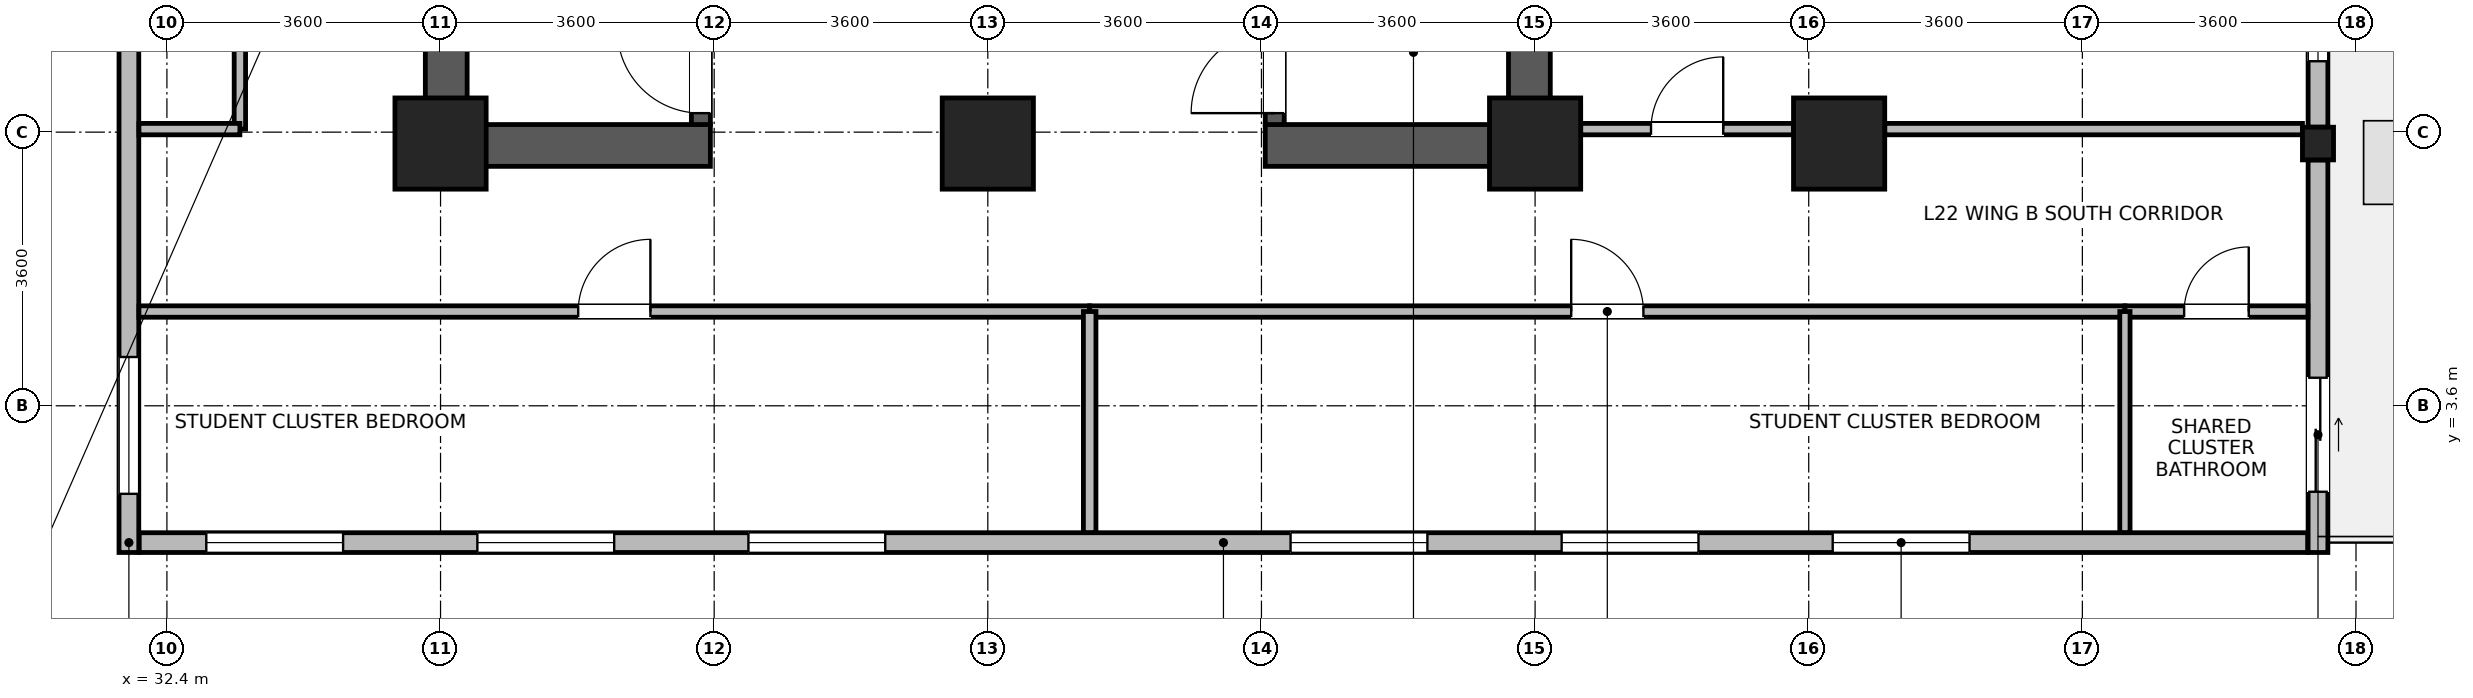
"""IFC4 building model, lengths in metres.
Left out: names, types, materials, properties, quantities, classifications, styles, units other than length and angle.
Written with IfcOpenShell. Run it as: python <this file> out.ifc"""

import sys

from ifc_helpers import new_model, si_unit, direction, frame, frame_2d, origin, origin_2d, place, context, subcontext, project, spatial, rectangle, i_section, extrude, source, transform, mapped, element, fill, save


model = new_model("IFC4")
c1 = context("Model", 3, precision=1e-05, world=origin(), true_north=direction((0.0, 1.0)))
c2 = subcontext(c1, "Body", "Model", "MODEL_VIEW")
j1 = project(units=[si_unit("LENGTHUNIT", "METRE"), si_unit("PLANEANGLEUNIT", "RADIAN")], contexts=[c1])
p1 = place(None, origin())
s1 = spatial("IfcSite", under=j1, at=p1, CompositionType="ELEMENT")
p2 = place(p1, origin())
s2 = spatial("IfcBuilding", under=s1, at=p2, CompositionType="ELEMENT")
p3 = place(p2, frame((0.0, 0.0, 89.7)))
s3 = spatial("IfcBuildingStorey", under=s2, at=p3, CompositionType="ELEMENT", Elevation=89.7)
for number, where, z_axis, x_axis in (
    (1, (36.075, 6.75, 0.0), (0.0, 0.0, 1.0), (0.0, 1.0, 0.0)),
    (2, (50.325, 6.75, 0.0), (0.0, 0.0, 1.0), (0.0, 1.0, 0.0)),
):
    element("IfcWall", number, at=place(p3, frame(where, z_axis=z_axis, x_axis=x_axis)), inside=s3, PredefinedType="SHEAR", context=c2, shape_type="SweptSolid", body=[
        extrude(rectangle(XDim=8.1, YDim=0.55, at=frame_2d((4.05, 0.0))), origin(), (0.0, 0.0, 1.0), 3.45),
    ])
for number, where, z_axis, x_axis in (
    (3, (36.35, 7.025, 0.0), (0.0, 0.0, 1.0), (1.0, 0.0, 0.0)),
    (4, (46.85, 7.025, 0.0), (0.0, 0.0, 1.0), (1.0, 0.0, 0.0)),
):
    element("IfcWall", number, at=place(p3, frame(where, z_axis=z_axis, x_axis=x_axis)), inside=s3, PredefinedType="SHEAR", context=c2, shape_type="SweptSolid", body=[
        extrude(rectangle(XDim=3.2, YDim=0.55, at=frame_2d((1.6, 0.0))), origin(), (0.0, 0.0, 1.0), 3.45),
    ])
p4 = place(p3, frame((39.425, 7.3, 0.0), z_axis=(0.0, 0.0, 1.0), x_axis=(0.0, 1.0, 0.0)))
e5 = element("IfcWall", 5, at=p4, inside=s3, PredefinedType="SHEAR", context=c2, shape_type="SweptSolid", body=[
    extrude(rectangle(XDim=7.0, YDim=0.25, at=frame_2d((3.5, 0.0))), origin(), (0.0, 0.0, 1.0), 3.45),
])
p5 = place(p4, frame((0.15, 0.0, 0.0)))
e6 = element("IfcOpeningElement", 6, at=p5, cuts=e5, PredefinedType="OPENING", context=c2, shape_type="SweptSolid", body=[
    extrude(rectangle(XDim=1.1, YDim=2.08, at=frame_2d((0.55, 1.04))), frame((0.0, 0.135, 0.0), z_axis=(0.0, -1.0, 0.0), x_axis=(1.0, 0.0, 0.0)), (0.0, 0.0, 1.0), 0.27),
])
p6 = place(p3, frame((46.975, 7.3, 0.0), z_axis=(0.0, 0.0, 1.0), x_axis=(0.0, 1.0, 0.0)))
e7 = element("IfcWall", 7, at=p6, inside=s3, PredefinedType="SHEAR", context=c2, shape_type="SweptSolid", body=[
    extrude(rectangle(XDim=7.0, YDim=0.25, at=frame_2d((3.5, 0.0))), origin(), (0.0, 0.0, 1.0), 3.45),
])
p7 = place(p6, frame((0.15, 0.0, 0.0)))
e8 = element("IfcOpeningElement", 8, at=p7, cuts=e7, PredefinedType="OPENING", context=c2, shape_type="SweptSolid", body=[
    extrude(rectangle(XDim=1.1, YDim=2.08, at=frame_2d((0.55, 1.04))), frame((0.0, 0.135, 0.0), z_axis=(0.0, -1.0, 0.0), x_axis=(1.0, 0.0, 0.0)), (0.0, 0.0, 1.0), 0.27),
])
m1 = source(origin(), c2, "Body", "SweptSolid", [
    extrude(rectangle(XDim=1.2, YDim=1.2, at=origin_2d()), origin(), (0.0, 0.0, 1.0), 3.7),
])
for number, where, z_axis, x_axis in (
    (9, (36.0, 7.05, 0.0), (0.0, 0.0, 1.0), (1.0, 0.0, 0.0)),
    (10, (43.2, 7.05, 0.0), (0.0, 0.0, 1.0), (1.0, 0.0, 0.0)),
    (11, (50.4, 7.05, 0.0), (0.0, 0.0, 1.0), (1.0, 0.0, 0.0)),
    (12, (54.4, 7.05, 0.0), (0.0, 0.0, 1.0), (1.0, 0.0, 0.0)),
):
    element("IfcColumn", number, at=place(p3, frame(where, z_axis=z_axis, x_axis=x_axis)), inside=s3, PredefinedType="COLUMN", context=c2, shape_type="MappedRepresentation", body=[
        mapped(m1, transform((0.0, 0.0, 0.0), x_axis=(1.0, 0.0, 0.0), y_axis=(0.0, 1.0, 0.0), z_axis=(0.0, 0.0, 1.0), scale=1.0)),
    ])
m2 = source(origin(), c2, "Body", "SweptSolid", [
    extrude(i_section(OverallWidth=0.409, OverallDepth=0.43, WebThickness=0.024, FlangeThickness=0.033, FilletRadius=0.015, at=origin_2d()), origin(), (0.0, 0.0, 1.0), 3.7),
])
p8 = place(p3, frame((60.7, 7.05, 0.0), z_axis=(0.0, 0.0, 1.0), x_axis=(1.0, 0.0, 0.0)))
e13 = element("IfcColumn", 13, at=p8, inside=s3, PredefinedType="COLUMN", context=c2, shape_type="MappedRepresentation", body=[
    mapped(m2, transform((0.0, 0.0, 0.0), x_axis=(1.0, 0.0, 0.0), y_axis=(0.0, 1.0, 0.0), z_axis=(0.0, 0.0, 1.0), scale=1.0)),
])
p9 = place(p3, frame((60.565, 1.8, 0.0), z_axis=(0.0, 0.0, 1.0), x_axis=(-1.0, 0.0, 0.0)))
e14 = element("IfcWall", 14, at=p9, inside=s3, PredefinedType="STANDARD", context=c2, shape_type="SweptSolid", body=[
    extrude(rectangle(XDim=28.53, YDim=0.26, at=frame_2d((14.265, 0.0))), origin(), (0.0, 0.0, 1.0), 3.43),
])
p10 = place(p9, frame((4.449, 0.0, 0.85)))
e15 = element("IfcOpeningElement", 15, at=p10, cuts=e14, PredefinedType="OPENING", context=c2, shape_type="SweptSolid", body=[
    extrude(rectangle(XDim=1.8, YDim=1.85, at=frame_2d((0.9, 0.925))), frame((0.0, 0.14, 0.0), z_axis=(0.0, -1.0, 0.0), x_axis=(1.0, 0.0, 0.0)), (0.0, 0.0, 1.0), 0.28),
])
p11 = place(p9, frame((8.016, 0.0, 0.85)))
e16 = element("IfcOpeningElement", 16, at=p11, cuts=e14, PredefinedType="OPENING", context=c2, shape_type="SweptSolid", body=[
    extrude(rectangle(XDim=1.8, YDim=1.85, at=frame_2d((0.9, 0.925))), frame((0.0, 0.14, 0.0), z_axis=(0.0, -1.0, 0.0), x_axis=(1.0, 0.0, 0.0)), (0.0, 0.0, 1.0), 0.28),
])
p12 = place(p9, frame((11.582, 0.0, 0.85)))
e17 = element("IfcOpeningElement", 17, at=p12, cuts=e14, PredefinedType="OPENING", context=c2, shape_type="SweptSolid", body=[
    extrude(rectangle(XDim=1.8, YDim=1.85, at=frame_2d((0.9, 0.925))), frame((0.0, 0.14, 0.0), z_axis=(0.0, -1.0, 0.0), x_axis=(1.0, 0.0, 0.0)), (0.0, 0.0, 1.0), 0.28),
])
p13 = place(p9, frame((18.714, 0.0, 0.85)))
e18 = element("IfcOpeningElement", 18, at=p13, cuts=e14, PredefinedType="OPENING", context=c2, shape_type="SweptSolid", body=[
    extrude(rectangle(XDim=1.8, YDim=1.85, at=frame_2d((0.9, 0.925))), frame((0.0, 0.14, 0.0), z_axis=(0.0, -1.0, 0.0), x_axis=(1.0, 0.0, 0.0)), (0.0, 0.0, 1.0), 0.28),
])
p14 = place(p9, frame((22.281, 0.0, 0.85)))
e19 = element("IfcOpeningElement", 19, at=p14, cuts=e14, PredefinedType="OPENING", context=c2, shape_type="SweptSolid", body=[
    extrude(rectangle(XDim=1.8, YDim=1.85, at=frame_2d((0.9, 0.925))), frame((0.0, 0.14, 0.0), z_axis=(0.0, -1.0, 0.0), x_axis=(1.0, 0.0, 0.0)), (0.0, 0.0, 1.0), 0.28),
])
p15 = place(p9, frame((25.847, 0.0, 0.85)))
e20 = element("IfcOpeningElement", 20, at=p15, cuts=e14, PredefinedType="OPENING", context=c2, shape_type="SweptSolid", body=[
    extrude(rectangle(XDim=1.8, YDim=1.85, at=frame_2d((0.9, 0.925))), frame((0.0, 0.14, 0.0), z_axis=(0.0, -1.0, 0.0), x_axis=(1.0, 0.0, 0.0)), (0.0, 0.0, 1.0), 0.28),
])
p16 = place(p3, frame((60.7, 6.834, 0.0), z_axis=(0.0, 0.0, 1.0), x_axis=(0.0, -1.0, 0.0)))
e21 = element("IfcWall", 21, at=p16, inside=s3, PredefinedType="STANDARD", context=c2, shape_type="SweptSolid", body=[
    extrude(rectangle(XDim=5.164, YDim=0.26, at=frame_2d((2.582, 0.0))), origin(), (0.0, 0.0, 1.0), 3.43),
])
p17 = place(p16, frame((2.865, 0.0, 0.0)))
e22 = element("IfcOpeningElement", 22, at=p17, cuts=e21, PredefinedType="OPENING", context=c2, shape_type="SweptSolid", body=[
    extrude(rectangle(XDim=1.5, YDim=2.15, at=frame_2d((0.75, 1.075))), frame((0.0, 0.14, 0.0), z_axis=(0.0, -1.0, 0.0), x_axis=(1.0, 0.0, 0.0)), (0.0, 0.0, 1.0), 0.28),
])
p18 = place(p3, frame((60.7, 14.334, 0.0), z_axis=(0.0, 0.0, 1.0), x_axis=(0.0, -1.0, 0.0)))
e23 = element("IfcWall", 23, at=p18, inside=s3, PredefinedType="STANDARD", context=c2, shape_type="SweptSolid", body=[
    extrude(rectangle(XDim=7.068, YDim=0.26, at=frame_2d((3.534, 0.0))), origin(), (0.0, 0.0, 1.0), 2.93),
])
p19 = place(p18, frame((0.867, 0.0, 0.85)))
e24 = element("IfcOpeningElement", 24, at=p19, cuts=e23, PredefinedType="OPENING", context=c2, shape_type="SweptSolid", body=[
    extrude(rectangle(XDim=1.8, YDim=1.85, at=frame_2d((0.9, 0.925))), frame((0.0, 0.14, 0.0), z_axis=(0.0, -1.0, 0.0), x_axis=(1.0, 0.0, 0.0)), (0.0, 0.0, 1.0), 0.28),
])
p20 = place(p18, frame((4.401, 0.0, 0.85)))
e25 = element("IfcOpeningElement", 25, at=p20, cuts=e23, PredefinedType="OPENING", context=c2, shape_type="SweptSolid", body=[
    extrude(rectangle(XDim=1.8, YDim=1.85, at=frame_2d((0.9, 0.925))), frame((0.0, 0.14, 0.0), z_axis=(0.0, -1.0, 0.0), x_axis=(1.0, 0.0, 0.0)), (0.0, 0.0, 1.0), 0.28),
])
p21 = place(p3, frame((31.9, 1.67, 0.0), z_axis=(0.0, 0.0, 1.0), x_axis=(0.0, 1.0, 0.0)))
e26 = element("IfcWall", 26, at=p21, inside=s3, PredefinedType="STANDARD", context=c2, shape_type="SweptSolid", body=[
    extrude(rectangle(XDim=20.06, YDim=0.26, at=frame_2d((10.03, 0.0))), origin(), (0.0, 0.0, 1.0), 3.43),
])
p22 = place(p21, frame((0.772, 0.0, 0.85)))
e27 = element("IfcOpeningElement", 27, at=p22, cuts=e26, PredefinedType="OPENING", context=c2, shape_type="SweptSolid", body=[
    extrude(rectangle(XDim=1.8, YDim=1.85, at=frame_2d((0.9, 0.925))), frame((0.0, 0.14, 0.0), z_axis=(0.0, -1.0, 0.0), x_axis=(1.0, 0.0, 0.0)), (0.0, 0.0, 1.0), 0.28),
])
p23 = place(p21, frame((7.458, 0.0, 0.85)))
e28 = element("IfcOpeningElement", 28, at=p23, cuts=e26, PredefinedType="OPENING", context=c2, shape_type="SweptSolid", body=[
    extrude(rectangle(XDim=1.8, YDim=1.85, at=frame_2d((0.9, 0.925))), frame((0.0, 0.14, 0.0), z_axis=(0.0, -1.0, 0.0), x_axis=(1.0, 0.0, 0.0)), (0.0, 0.0, 1.0), 0.28),
])
p24 = place(p21, frame((14.145, 0.0, 0.85)))
e29 = element("IfcOpeningElement", 29, at=p24, cuts=e26, PredefinedType="OPENING", context=c2, shape_type="SweptSolid", body=[
    extrude(rectangle(XDim=1.8, YDim=1.85, at=frame_2d((0.9, 0.925))), frame((0.0, 0.14, 0.0), z_axis=(0.0, -1.0, 0.0), x_axis=(1.0, 0.0, 0.0)), (0.0, 0.0, 1.0), 0.28),
])
p25 = place(p21, frame((17.488, 0.0, 0.85)))
e30 = element("IfcOpeningElement", 30, at=p25, cuts=e26, PredefinedType="OPENING", context=c2, shape_type="SweptSolid", body=[
    extrude(rectangle(XDim=1.8, YDim=1.85, at=frame_2d((0.9, 0.925))), frame((0.0, 0.14, 0.0), z_axis=(0.0, -1.0, 0.0), x_axis=(1.0, 0.0, 0.0)), (0.0, 0.0, 1.0), 0.28),
])
p26 = place(p3, frame((44.54, 4.84, 0.0), z_axis=(0.0, 0.0, 1.0), x_axis=(1.0, 0.0, 0.0)))
e31 = element("IfcWall", 31, at=p26, inside=s3, PredefinedType="PARTITIONING", context=c2, shape_type="SweptSolid", body=[
    extrude(rectangle(XDim=13.62, YDim=0.15, at=frame_2d((6.81, 0.0))), origin(), (0.0, 0.0, 1.0), 3.43),
])
p27 = place(p26, frame((6.335, 0.0, 0.0)))
e32 = element("IfcOpeningElement", 32, at=p27, cuts=e31, PredefinedType="OPENING", context=c2, shape_type="SweptSolid", body=[
    extrude(rectangle(XDim=0.95, YDim=2.1, at=frame_2d((0.475, 1.05))), frame((0.0, 0.085, 0.0), z_axis=(0.0, -1.0, 0.0), x_axis=(1.0, 0.0, 0.0)), (0.0, 0.0, 1.0), 0.17),
])
p28 = place(p3, frame((32.032, 4.84, 0.0), z_axis=(0.0, 0.0, 1.0), x_axis=(1.0, 0.0, 0.0)))
e33 = element("IfcWall", 33, at=p28, inside=s3, PredefinedType="PARTITIONING", context=c2, shape_type="SweptSolid", body=[
    extrude(rectangle(XDim=12.508, YDim=0.15, at=frame_2d((6.254, 0.0))), origin(), (0.0, 0.0, 1.0), 3.43),
])
p29 = place(p28, frame((5.779, 0.0, 0.0)))
e34 = element("IfcOpeningElement", 34, at=p29, cuts=e33, PredefinedType="OPENING", context=c2, shape_type="SweptSolid", body=[
    extrude(rectangle(XDim=0.95, YDim=2.1, at=frame_2d((0.475, 1.05))), frame((0.0, 0.085, 0.0), z_axis=(0.0, -1.0, 0.0), x_axis=(1.0, 0.0, 0.0)), (0.0, 0.0, 1.0), 0.17),
])
p30 = place(p3, frame((51.0, 7.24, 0.0), z_axis=(0.0, 0.0, 1.0), x_axis=(1.0, 0.0, 0.0)))
e35 = element("IfcWall", 35, at=p30, inside=s3, PredefinedType="PARTITIONING", context=c2, shape_type="SweptSolid", body=[
    extrude(rectangle(XDim=2.8, YDim=0.15, at=frame_2d((1.4, 0.0))), origin(), (0.0, 0.0, 1.0), 2.78),
])
p31 = place(p30, frame((0.925, 0.0, 0.0)))
e36 = element("IfcOpeningElement", 36, at=p31, cuts=e35, PredefinedType="OPENING", context=c2, shape_type="SweptSolid", body=[
    extrude(rectangle(XDim=0.95, YDim=2.1, at=frame_2d((0.475, 1.05))), frame((0.0, 0.085, 0.0), z_axis=(0.0, -1.0, 0.0), x_axis=(1.0, 0.0, 0.0)), (0.0, 0.0, 1.0), 0.17),
])
p32 = place(p3, frame((55.0, 7.24, 0.0), z_axis=(0.0, 0.0, 1.0), x_axis=(1.0, 0.0, 0.0)))
e37 = element("IfcWall", 37, at=p32, inside=s3, PredefinedType="PARTITIONING", context=c2, shape_type="SweptSolid", body=[
    extrude(rectangle(XDim=5.496, YDim=0.15, at=frame_2d((2.748, 0.0))), origin(), (0.0, 0.0, 1.0), 2.78),
])
p33 = place(p3, frame((33.36, 7.24, 0.0), z_axis=(0.0, 0.0, 1.0), x_axis=(0.0, 1.0, 0.0)))
e38 = element("IfcWall", 38, at=p33, inside=s3, PredefinedType="PARTITIONING", context=c2, shape_type="SweptSolid", body=[
    extrude(rectangle(XDim=7.26, YDim=0.15, at=frame_2d((3.63, 0.0))), origin(), (0.0, 0.0, 1.0), 3.43),
])
p34 = place(p33, frame((2.98, 0.0, 0.0)))
e39 = element("IfcOpeningElement", 39, at=p34, cuts=e38, PredefinedType="OPENING", context=c2, shape_type="SweptSolid", body=[
    extrude(rectangle(XDim=1.3, YDim=2.12, at=frame_2d((0.65, 1.06))), frame((0.0, 0.085, 0.0), z_axis=(0.0, -1.0, 0.0), x_axis=(1.0, 0.0, 0.0)), (0.0, 0.0, 1.0), 0.17),
])
p35 = place(p3, frame((58.16, 4.84, 0.0), z_axis=(0.0, 0.0, 1.0), x_axis=(1.0, 0.0, 0.0)))
e40 = element("IfcWall", 40, at=p35, inside=s3, PredefinedType="PARTITIONING", context=c2, shape_type="SweptSolid", body=[
    extrude(rectangle(XDim=2.408, YDim=0.15, at=frame_2d((1.204, 0.0))), origin(), (0.0, 0.0, 1.0), 3.43),
])
p36 = place(p35, frame((0.779, 0.0, 0.0)))
e41 = element("IfcOpeningElement", 41, at=p36, cuts=e40, PredefinedType="OPENING", context=c2, shape_type="SweptSolid", body=[
    extrude(rectangle(XDim=0.85, YDim=2.04, at=frame_2d((0.425, 1.02))), frame((0.0, 0.085, 0.0), z_axis=(0.0, -1.0, 0.0), x_axis=(1.0, 0.0, 0.0)), (0.0, 0.0, 1.0), 0.17),
])
p37 = place(p3, frame((32.032, 7.24, 0.0), z_axis=(0.0, 0.0, 1.0), x_axis=(1.0, 0.0, 0.0)))
e42 = element("IfcWall", 42, at=p37, inside=s3, PredefinedType="PARTITIONING", context=c2, shape_type="SweptSolid", body=[
    extrude(rectangle(XDim=1.328, YDim=0.15, at=frame_2d((0.664, 0.0))), origin(), (0.0, 0.0, 1.0), 3.43),
])
p38 = place(p3, frame((44.54, 1.932, 0.0), z_axis=(0.0, 0.0, 1.0), x_axis=(0.0, 1.0, 0.0)))
e43 = element("IfcWall", 43, at=p38, inside=s3, PredefinedType="PARTITIONING", context=c2, shape_type="SweptSolid", body=[
    extrude(rectangle(XDim=2.908, YDim=0.165, at=frame_2d((1.454, 0.0))), origin(), (0.0, 0.0, 1.0), 3.43),
])
p39 = place(p3, frame((58.16, 1.932, 0.0), z_axis=(0.0, 0.0, 1.0), x_axis=(0.0, 1.0, 0.0)))
e44 = element("IfcWall", 44, at=p39, inside=s3, PredefinedType="PARTITIONING", context=c2, shape_type="SweptSolid", body=[
    extrude(rectangle(XDim=2.908, YDim=0.135, at=frame_2d((1.454, 0.0))), origin(), (0.0, 0.0, 1.0), 3.43),
])
p40 = place(p10, origin())
e45 = element("IfcWindow", 45, at=p40, inside=s3, PartitioningType="SINGLE_PANEL", PredefinedType="WINDOW", context=c2, shape_type="SweptSolid", body=[
    extrude(rectangle(XDim=1.8, YDim=1.85, at=frame_2d((0.9, 0.925))), frame((0.0, 0.03, 0.0), z_axis=(0.0, -1.0, 0.0), x_axis=(1.0, 0.0, 0.0)), (0.0, 0.0, 1.0), 0.06),
])
fill(e15, e45)
p41 = place(p11, origin())
e46 = element("IfcWindow", 46, at=p41, inside=s3, PartitioningType="SINGLE_PANEL", PredefinedType="WINDOW", context=c2, shape_type="SweptSolid", body=[
    extrude(rectangle(XDim=1.8, YDim=1.85, at=frame_2d((0.9, 0.925))), frame((0.0, 0.03, 0.0), z_axis=(0.0, -1.0, 0.0), x_axis=(1.0, 0.0, 0.0)), (0.0, 0.0, 1.0), 0.06),
])
fill(e16, e46)
p42 = place(p12, origin())
e47 = element("IfcWindow", 47, at=p42, inside=s3, PartitioningType="SINGLE_PANEL", PredefinedType="WINDOW", context=c2, shape_type="SweptSolid", body=[
    extrude(rectangle(XDim=1.8, YDim=1.85, at=frame_2d((0.9, 0.925))), frame((0.0, 0.03, 0.0), z_axis=(0.0, -1.0, 0.0), x_axis=(1.0, 0.0, 0.0)), (0.0, 0.0, 1.0), 0.06),
])
fill(e17, e47)
p43 = place(p13, origin())
e48 = element("IfcWindow", 48, at=p43, inside=s3, PartitioningType="SINGLE_PANEL", PredefinedType="WINDOW", context=c2, shape_type="SweptSolid", body=[
    extrude(rectangle(XDim=1.8, YDim=1.85, at=frame_2d((0.9, 0.925))), frame((0.0, 0.03, 0.0), z_axis=(0.0, -1.0, 0.0), x_axis=(1.0, 0.0, 0.0)), (0.0, 0.0, 1.0), 0.06),
])
fill(e18, e48)
p44 = place(p14, origin())
e49 = element("IfcWindow", 49, at=p44, inside=s3, PartitioningType="SINGLE_PANEL", PredefinedType="WINDOW", context=c2, shape_type="SweptSolid", body=[
    extrude(rectangle(XDim=1.8, YDim=1.85, at=frame_2d((0.9, 0.925))), frame((0.0, 0.03, 0.0), z_axis=(0.0, -1.0, 0.0), x_axis=(1.0, 0.0, 0.0)), (0.0, 0.0, 1.0), 0.06),
])
fill(e19, e49)
p45 = place(p15, origin())
e50 = element("IfcWindow", 50, at=p45, inside=s3, PartitioningType="SINGLE_PANEL", PredefinedType="WINDOW", context=c2, shape_type="SweptSolid", body=[
    extrude(rectangle(XDim=1.8, YDim=1.85, at=frame_2d((0.9, 0.925))), frame((0.0, 0.03, 0.0), z_axis=(0.0, -1.0, 0.0), x_axis=(1.0, 0.0, 0.0)), (0.0, 0.0, 1.0), 0.06),
])
fill(e20, e50)
p46 = place(p17, origin())
e51 = element("IfcDoor", 51, at=p46, inside=s3, OperationType="SLIDING_TO_LEFT", PredefinedType="DOOR", context=c2, shape_type="SweptSolid", body=[
    extrude(rectangle(XDim=1.5, YDim=2.15, at=frame_2d((0.75, 1.075))), frame((0.0, 0.025, 0.0), z_axis=(0.0, -1.0, 0.0), x_axis=(1.0, 0.0, 0.0)), (0.0, 0.0, 1.0), 0.05),
])
fill(e22, e51)
p47 = place(p20, origin())
e52 = element("IfcWindow", 52, at=p47, inside=s3, PartitioningType="SINGLE_PANEL", PredefinedType="WINDOW", context=c2, shape_type="SweptSolid", body=[
    extrude(rectangle(XDim=1.8, YDim=1.85, at=frame_2d((0.9, 0.925))), frame((0.0, 0.03, 0.0), z_axis=(0.0, -1.0, 0.0), x_axis=(1.0, 0.0, 0.0)), (0.0, 0.0, 1.0), 0.06),
])
fill(e25, e52)
p48 = place(p22, origin())
e53 = element("IfcWindow", 53, at=p48, inside=s3, PartitioningType="SINGLE_PANEL", PredefinedType="WINDOW", context=c2, shape_type="SweptSolid", body=[
    extrude(rectangle(XDim=1.8, YDim=1.85, at=frame_2d((0.9, 0.925))), frame((0.0, 0.03, 0.0), z_axis=(0.0, -1.0, 0.0), x_axis=(1.0, 0.0, 0.0)), (0.0, 0.0, 1.0), 0.06),
])
fill(e27, e53)
p49 = place(p5, origin())
e54 = element("IfcDoor", 54, at=p49, inside=s3, OperationType="SINGLE_SWING_RIGHT", PredefinedType="DOOR", context=c2, shape_type="SweptSolid", body=[
    extrude(rectangle(XDim=1.1, YDim=2.08, at=frame_2d((0.55, 1.04))), frame((0.0, 0.025, 0.0), z_axis=(0.0, -1.0, 0.0), x_axis=(1.0, 0.0, 0.0)), (0.0, 0.0, 1.0), 0.05),
])
fill(e6, e54)
p50 = place(p7, origin())
e55 = element("IfcDoor", 55, at=p50, inside=s3, OperationType="SINGLE_SWING_LEFT", PredefinedType="DOOR", context=c2, shape_type="SweptSolid", body=[
    extrude(rectangle(XDim=1.1, YDim=2.08, at=frame_2d((0.55, 1.04))), frame((0.0, 0.025, 0.0), z_axis=(0.0, -1.0, 0.0), x_axis=(1.0, 0.0, 0.0)), (0.0, 0.0, 1.0), 0.05),
])
fill(e8, e55)
p51 = place(p27, origin())
e56 = element("IfcDoor", 56, at=p51, inside=s3, OperationType="SINGLE_SWING_LEFT", PredefinedType="DOOR", context=c2, shape_type="SweptSolid", body=[
    extrude(rectangle(XDim=0.95, YDim=2.1, at=frame_2d((0.475, 1.05))), frame((0.0, 0.025, 0.0), z_axis=(0.0, -1.0, 0.0), x_axis=(1.0, 0.0, 0.0)), (0.0, 0.0, 1.0), 0.05),
])
fill(e32, e56)
p52 = place(p29, origin())
e57 = element("IfcDoor", 57, at=p52, inside=s3, OperationType="SINGLE_SWING_RIGHT", PredefinedType="DOOR", context=c2, shape_type="SweptSolid", body=[
    extrude(rectangle(XDim=0.95, YDim=2.1, at=frame_2d((0.475, 1.05))), frame((0.0, 0.025, 0.0), z_axis=(0.0, -1.0, 0.0), x_axis=(1.0, 0.0, 0.0)), (0.0, 0.0, 1.0), 0.05),
])
fill(e34, e57)
p53 = place(p31, origin())
e58 = element("IfcDoor", 58, at=p53, inside=s3, OperationType="SINGLE_SWING_RIGHT", PredefinedType="DOOR", context=c2, shape_type="SweptSolid", body=[
    extrude(rectangle(XDim=0.95, YDim=2.1, at=frame_2d((0.475, 1.05))), frame((0.0, 0.025, 0.0), z_axis=(0.0, -1.0, 0.0), x_axis=(1.0, 0.0, 0.0)), (0.0, 0.0, 1.0), 0.05),
])
fill(e36, e58)
p54 = place(p36, origin())
e59 = element("IfcDoor", 59, at=p54, inside=s3, OperationType="SINGLE_SWING_RIGHT", PredefinedType="DOOR", context=c2, shape_type="SweptSolid", body=[
    extrude(rectangle(XDim=0.85, YDim=2.04, at=frame_2d((0.425, 1.02))), frame((0.0, 0.025, 0.0), z_axis=(0.0, -1.0, 0.0), x_axis=(1.0, 0.0, 0.0)), (0.0, 0.0, 1.0), 0.05),
])
fill(e41, e59)
save(model, sys.argv[1])
